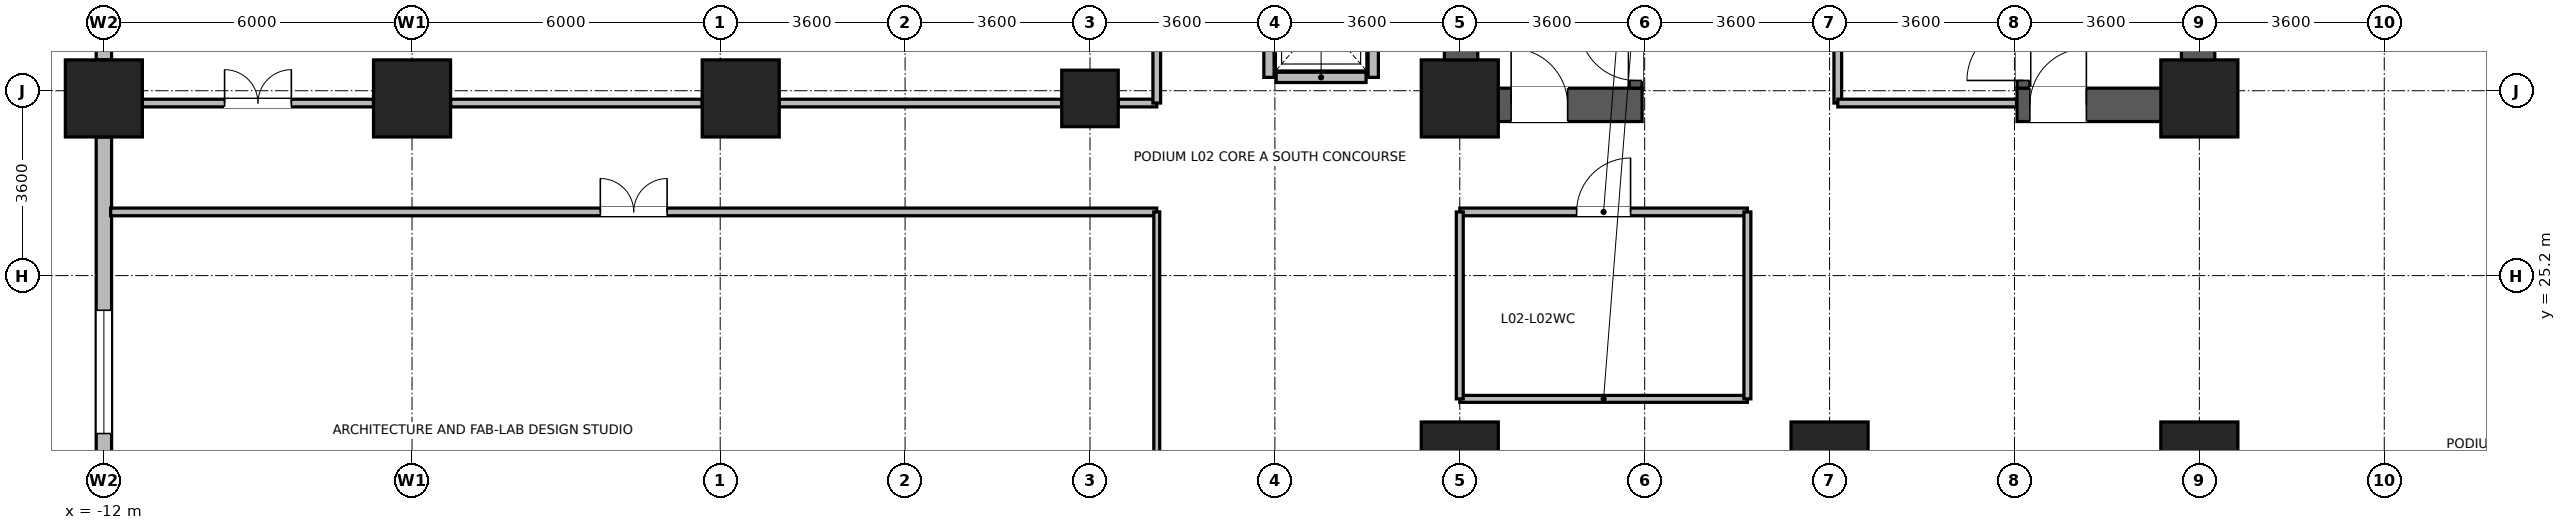
"""IFC4 building model, lengths in metres.
Left out: names, types, materials, properties, quantities, classifications, styles, units other than length and angle.
Written with IfcOpenShell. Run it as: python <this file> out.ifc"""

import sys

from ifc_helpers import new_model, si_unit, direction, frame, frame_2d, origin, origin_2d, place, context, subcontext, project, spatial, rectangle, circle, extrude, source, transform, mapped, element, fill, save


model = new_model("IFC4")
c1 = context("Model", 3, precision=1e-05, world=origin(), true_north=direction((0.0, 1.0)))
c2 = subcontext(c1, "Body", "Model", "MODEL_VIEW")
j1 = project(units=[si_unit("LENGTHUNIT", "METRE"), si_unit("PLANEANGLEUNIT", "RADIAN")], contexts=[c1])
p1 = place(None, origin())
s1 = spatial("IfcSite", under=j1, at=p1, CompositionType="ELEMENT")
p2 = place(p1, origin())
s2 = spatial("IfcBuilding", under=s1, at=p2, CompositionType="ELEMENT")
p3 = place(p2, frame((0.0, 0.0, 10.2)))
s3 = spatial("IfcBuildingStorey", under=s2, at=p3, CompositionType="ELEMENT", Elevation=10.2)
for number, where, z_axis, x_axis in (
    (1, (14.425, 28.2, 0.0), (0.0, 0.0, 1.0), (0.0, 1.0, 0.0)),
    (2, (28.775, 28.2, 0.0), (0.0, 0.0, 1.0), (0.0, 1.0, 0.0)),
):
    element("IfcWall", number, at=place(p3, frame(where, z_axis=z_axis, x_axis=x_axis)), inside=s3, PredefinedType="SHEAR", context=c2, shape_type="SweptSolid", body=[
        extrude(rectangle(XDim=8.3, YDim=0.65, at=frame_2d((4.15, 0.0))), origin(), (0.0, 0.0, 1.0), 4.52),
    ])
p4 = place(p3, frame((14.75, 28.525, 0.0), z_axis=(0.0, 0.0, 1.0), x_axis=(1.0, 0.0, 0.0)))
e3 = element("IfcWall", 3, at=p4, inside=s3, PredefinedType="SHEAR", context=c2, shape_type="SweptSolid", body=[
    extrude(rectangle(XDim=3.2, YDim=0.65, at=frame_2d((1.6, 0.0))), origin(), (0.0, 0.0, 1.0), 4.52),
])
p5 = place(p4, frame((0.65, 0.0, 0.0)))
e4 = element("IfcOpeningElement", 4, at=p5, cuts=e3, PredefinedType="OPENING", context=c2, shape_type="SweptSolid", body=[
    extrude(rectangle(XDim=1.1, YDim=2.08, at=frame_2d((0.55, 1.04))), frame((0.0, 0.335, 0.0), z_axis=(0.0, -1.0, 0.0), x_axis=(1.0, 0.0, 0.0)), (0.0, 0.0, 1.0), 0.67),
])
p6 = place(p3, frame((25.25, 28.525, 0.0), z_axis=(0.0, 0.0, 1.0), x_axis=(1.0, 0.0, 0.0)))
e5 = element("IfcWall", 5, at=p6, inside=s3, PredefinedType="SHEAR", context=c2, shape_type="SweptSolid", body=[
    extrude(rectangle(XDim=3.2, YDim=0.65, at=frame_2d((1.6, 0.0))), origin(), (0.0, 0.0, 1.0), 4.52),
])
p7 = place(p6, frame((0.25, 0.0, 0.0)))
e6 = element("IfcOpeningElement", 6, at=p7, cuts=e5, PredefinedType="OPENING", context=c2, shape_type="SweptSolid", body=[
    extrude(rectangle(XDim=1.1, YDim=2.08, at=frame_2d((0.55, 1.04))), frame((0.0, 0.335, 0.0), z_axis=(0.0, -1.0, 0.0), x_axis=(1.0, 0.0, 0.0)), (0.0, 0.0, 1.0), 0.67),
])
p8 = place(p3, frame((17.825, 28.85, 0.0), z_axis=(0.0, 0.0, 1.0), x_axis=(0.0, 1.0, 0.0)))
e7 = element("IfcWall", 7, at=p8, inside=s3, PredefinedType="SHEAR", context=c2, shape_type="SweptSolid", body=[
    extrude(rectangle(XDim=7.0, YDim=0.25, at=frame_2d((3.5, 0.0))), origin(), (0.0, 0.0, 1.0), 4.52),
])
p9 = place(p8, frame((0.15, 0.0, 0.0)))
e8 = element("IfcOpeningElement", 8, at=p9, cuts=e7, PredefinedType="OPENING", context=c2, shape_type="SweptSolid", body=[
    extrude(rectangle(XDim=1.1, YDim=2.08, at=frame_2d((0.55, 1.04))), frame((0.0, 0.135, 0.0), z_axis=(0.0, -1.0, 0.0), x_axis=(1.0, 0.0, 0.0)), (0.0, 0.0, 1.0), 0.27),
])
p10 = place(p3, frame((25.375, 28.85, 0.0), z_axis=(0.0, 0.0, 1.0), x_axis=(0.0, 1.0, 0.0)))
e9 = element("IfcWall", 9, at=p10, inside=s3, PredefinedType="SHEAR", context=c2, shape_type="SweptSolid", body=[
    extrude(rectangle(XDim=7.0, YDim=0.25, at=frame_2d((3.5, 0.0))), origin(), (0.0, 0.0, 1.0), 4.52),
])
p11 = place(p10, frame((0.15, 0.0, 0.0)))
e10 = element("IfcOpeningElement", 10, at=p11, cuts=e9, PredefinedType="OPENING", context=c2, shape_type="SweptSolid", body=[
    extrude(rectangle(XDim=1.1, YDim=2.08, at=frame_2d((0.55, 1.04))), frame((0.0, 0.135, 0.0), z_axis=(0.0, -1.0, 0.0), x_axis=(1.0, 0.0, 0.0)), (0.0, 0.0, 1.0), 0.27),
])
m1 = source(origin(), c2, "Body", "SweptSolid", [
    extrude(circle(Radius=0.55, at=origin_2d()), origin(), (0.0, 0.0, 1.0), 4.8),
])
p12 = place(p3, frame((7.2, 28.65, 0.0), z_axis=(0.0, 0.0, 1.0), x_axis=(1.0, 0.0, 0.0)))
e11 = element("IfcColumn", 11, at=p12, inside=s3, PredefinedType="COLUMN", context=c2, shape_type="MappedRepresentation", body=[
    mapped(m1, transform((0.0, 0.0, 0.0), x_axis=(1.0, 0.0, 0.0), y_axis=(0.0, 1.0, 0.0), z_axis=(0.0, 0.0, 1.0), scale=1.0)),
])
m2 = source(origin(), c2, "Body", "SweptSolid", [
    extrude(rectangle(XDim=1.5, YDim=1.5, at=origin_2d()), origin(), (0.0, 0.0, 1.0), 4.8),
])
for number, where, z_axis, x_axis in (
    (12, (14.4, 21.6, 0.0), (0.0, 0.0, 1.0), (1.0, 0.0, 0.0)),
    (13, (14.4, 28.65, 0.0), (0.0, 0.0, 1.0), (1.0, 0.0, 0.0)),
    (14, (21.6, 21.6, 0.0), (0.0, 0.0, 1.0), (1.0, 0.0, 0.0)),
    (15, (28.8, 21.6, 0.0), (0.0, 0.0, 1.0), (1.0, 0.0, 0.0)),
    (16, (28.8, 28.65, 0.0), (0.0, 0.0, 1.0), (1.0, 0.0, 0.0)),
    (17, (0.4, 28.65, 0.0), (0.0, 0.0, 1.0), (1.0, 0.0, 0.0)),
    (18, (-12.0, 28.65, 0.0), (0.0, 0.0, 1.0), (1.0, 0.0, 0.0)),
    (19, (-6.0, 28.65, 0.0), (0.0, 0.0, 1.0), (1.0, 0.0, 0.0)),
):
    element("IfcColumn", number, at=place(p3, frame(where, z_axis=z_axis, x_axis=x_axis)), inside=s3, PredefinedType="COLUMN", context=c2, shape_type="MappedRepresentation", body=[
        mapped(m2, transform((0.0, 0.0, 0.0), x_axis=(1.0, 0.0, 0.0), y_axis=(0.0, 1.0, 0.0), z_axis=(0.0, 0.0, 1.0), scale=1.0)),
    ])
p13 = place(p3, frame((-12.0, 29.401, 0.0), z_axis=(0.0, 0.0, 1.0), x_axis=(0.0, 1.0, 0.0)))
e20 = element("IfcWall", 20, at=p13, inside=s3, PredefinedType="STANDARD", context=c2, shape_type="SweptSolid", body=[
    extrude(rectangle(XDim=5.998, YDim=0.3, at=frame_2d((2.999, 0.0))), origin(), (0.0, 0.0, 1.0), 3.9),
])
p14 = place(p13, frame((2.524, 0.0, 0.9)))
e21 = element("IfcOpeningElement", 21, at=p14, cuts=e20, PredefinedType="OPENING", context=c2, shape_type="SweptSolid", body=[
    extrude(rectangle(XDim=0.95, YDim=1.75, at=frame_2d((0.475, 0.875))), frame((0.0, 0.16, 0.0), z_axis=(0.0, -1.0, 0.0), x_axis=(1.0, 0.0, 0.0)), (0.0, 0.0, 1.0), 0.32),
])
p15 = place(p13, frame((1.037, 0.0, 0.9)))
e22 = element("IfcOpeningElement", 22, at=p15, cuts=e20, PredefinedType="OPENING", context=c2, shape_type="SweptSolid", body=[
    extrude(rectangle(XDim=0.95, YDim=1.75, at=frame_2d((0.475, 0.875))), frame((0.0, 0.16, 0.0), z_axis=(0.0, -1.0, 0.0), x_axis=(1.0, 0.0, 0.0)), (0.0, 0.0, 1.0), 0.32),
])
p16 = place(p3, frame((-12.0, 18.751, 0.0), z_axis=(0.0, 0.0, 1.0), x_axis=(0.0, 1.0, 0.0)))
e23 = element("IfcWall", 23, at=p16, inside=s3, PredefinedType="STANDARD", context=c2, shape_type="SweptSolid", body=[
    extrude(rectangle(XDim=9.148, YDim=0.3, at=frame_2d((4.574, 0.0))), origin(), (0.0, 0.0, 1.0), 3.9),
])
p17 = place(p16, frame((0.325, 0.0, 0.9)))
e24 = element("IfcOpeningElement", 24, at=p17, cuts=e23, PredefinedType="OPENING", context=c2, shape_type="SweptSolid", body=[
    extrude(rectangle(XDim=2.4, YDim=2.5, at=frame_2d((1.2, 1.25))), frame((0.0, 0.16, 0.0), z_axis=(0.0, -1.0, 0.0), x_axis=(1.0, 0.0, 0.0)), (0.0, 0.0, 1.0), 0.32),
])
p18 = place(p16, frame((3.374, 0.0, 0.9)))
e25 = element("IfcOpeningElement", 25, at=p18, cuts=e23, PredefinedType="OPENING", context=c2, shape_type="SweptSolid", body=[
    extrude(rectangle(XDim=2.4, YDim=2.5, at=frame_2d((1.2, 1.25))), frame((0.0, 0.16, 0.0), z_axis=(0.0, -1.0, 0.0), x_axis=(1.0, 0.0, 0.0)), (0.0, 0.0, 1.0), 0.32),
])
p19 = place(p3, frame((10.825, 29.06, 0.0), z_axis=(0.0, 0.0, 1.0), x_axis=(1.0, 0.0, 0.0)))
e26 = element("IfcWall", 26, at=p19, inside=s3, PredefinedType="PARTITIONING", context=c2, shape_type="SweptSolid", body=[
    extrude(rectangle(XDim=1.75, YDim=0.2, at=frame_2d((0.875, 0.0))), origin(), (0.0, 0.0, 1.0), 4.5),
])
for number, where, z_axis, x_axis in (
    (27, (10.685, 29.06, 0.0), (0.0, 0.0, 1.0), (0.0, 1.0, 0.0)),
    (28, (12.715, 29.06, 0.0), (0.0, 0.0, 1.0), (0.0, 1.0, 0.0)),
):
    element("IfcWall", number, at=place(p3, frame(where, z_axis=z_axis, x_axis=x_axis)), inside=s3, PredefinedType="PARTITIONING", context=c2, shape_type="SweptSolid", body=[
        extrude(rectangle(XDim=2.28, YDim=0.2, at=frame_2d((1.14, 0.0))), origin(), (0.0, 0.0, 1.0), 4.5),
    ])
p20 = place(p3, frame((-11.868, 26.44, 0.0), z_axis=(0.0, 0.0, 1.0), x_axis=(1.0, 0.0, 0.0)))
e29 = element("IfcWall", 29, at=p20, inside=s3, PredefinedType="PARTITIONING", context=c2, shape_type="SweptSolid", body=[
    extrude(rectangle(XDim=20.368, YDim=0.15, at=frame_2d((10.184, 0.0))), origin(), (0.0, 0.0, 1.0), 4.5),
])
p21 = place(p20, frame((9.534, 0.0, 0.0)))
e30 = element("IfcOpeningElement", 30, at=p21, cuts=e29, PredefinedType="OPENING", context=c2, shape_type="SweptSolid", body=[
    extrude(rectangle(XDim=1.3, YDim=2.12, at=frame_2d((0.65, 1.06))), frame((0.0, 0.085, 0.0), z_axis=(0.0, -1.0, 0.0), x_axis=(1.0, 0.0, 0.0)), (0.0, 0.0, 1.0), 0.17),
])
p22 = place(p3, frame((-11.25, 28.56, 0.0), z_axis=(0.0, 0.0, 1.0), x_axis=(1.0, 0.0, 0.0)))
e31 = element("IfcWall", 31, at=p22, inside=s3, PredefinedType="PARTITIONING", context=c2, shape_type="SweptSolid", body=[
    extrude(rectangle(XDim=4.5, YDim=0.15, at=frame_2d((2.25, 0.0))), origin(), (0.0, 0.0, 1.0), 3.8),
])
p23 = place(p22, frame((1.6, 0.0, 0.0)))
e32 = element("IfcOpeningElement", 32, at=p23, cuts=e31, PredefinedType="OPENING", context=c2, shape_type="SweptSolid", body=[
    extrude(rectangle(XDim=1.3, YDim=2.12, at=frame_2d((0.65, 1.06))), frame((0.0, 0.085, 0.0), z_axis=(0.0, -1.0, 0.0), x_axis=(1.0, 0.0, 0.0)), (0.0, 0.0, 1.0), 0.17),
])
p24 = place(p3, frame((-5.25, 28.56, 0.0), z_axis=(0.0, 0.0, 1.0), x_axis=(1.0, 0.0, 0.0)))
e33 = element("IfcWall", 33, at=p24, inside=s3, PredefinedType="PARTITIONING", context=c2, shape_type="SweptSolid", body=[
    extrude(rectangle(XDim=4.9, YDim=0.15, at=frame_2d((2.45, 0.0))), origin(), (0.0, 0.0, 1.0), 3.8),
])
p25 = place(p3, frame((1.15, 28.56, 0.0), z_axis=(0.0, 0.0, 1.0), x_axis=(1.0, 0.0, 0.0)))
e34 = element("IfcWall", 34, at=p25, inside=s3, PredefinedType="PARTITIONING", context=c2, shape_type="SweptSolid", body=[
    extrude(rectangle(XDim=5.5, YDim=0.15, at=frame_2d((2.75, 0.0))), origin(), (0.0, 0.0, 1.0), 3.8),
])
p26 = place(p3, frame((7.75, 28.56, 0.0), z_axis=(0.0, 0.0, 1.0), x_axis=(1.0, 0.0, 0.0)))
e35 = element("IfcWall", 35, at=p26, inside=s3, PredefinedType="PARTITIONING", context=c2, shape_type="SweptSolid", body=[
    extrude(rectangle(XDim=0.75, YDim=0.15, at=frame_2d((0.375, 0.0))), origin(), (0.0, 0.0, 1.0), 3.8),
])
p27 = place(p3, frame((8.5, 28.56, 0.0), z_axis=(0.0, 0.0, 1.0), x_axis=(0.0, 1.0, 0.0)))
e36 = element("IfcWall", 36, at=p27, inside=s3, PredefinedType="PARTITIONING", context=c2, shape_type="SweptSolid", body=[
    extrude(rectangle(XDim=7.68, YDim=0.15, at=frame_2d((3.84, 0.0))), origin(), (0.0, 0.0, 1.0), 4.5),
])
p28 = place(p3, frame((14.4, 26.44, 0.0), z_axis=(0.0, 0.0, 1.0), x_axis=(1.0, 0.0, 0.0)))
e37 = element("IfcWall", 37, at=p28, inside=s3, PredefinedType="PARTITIONING", context=c2, shape_type="SweptSolid", body=[
    extrude(rectangle(XDim=5.6, YDim=0.15, at=frame_2d((2.8, 0.0))), origin(), (0.0, 0.0, 1.0), 4.5),
])
p29 = place(p28, frame((2.275, 0.0, 0.0)))
e38 = element("IfcOpeningElement", 38, at=p29, cuts=e37, PredefinedType="OPENING", context=c2, shape_type="SweptSolid", body=[
    extrude(rectangle(XDim=1.05, YDim=2.12, at=frame_2d((0.525, 1.06))), frame((0.0, 0.085, 0.0), z_axis=(0.0, -1.0, 0.0), x_axis=(1.0, 0.0, 0.0)), (0.0, 0.0, 1.0), 0.17),
])
p30 = place(p3, frame((8.5, 18.132, 0.0), z_axis=(0.0, 0.0, 1.0), x_axis=(0.0, 1.0, 0.0)))
e39 = element("IfcWall", 39, at=p30, inside=s3, PredefinedType="PARTITIONING", context=c2, shape_type="SweptSolid", body=[
    extrude(rectangle(XDim=8.308, YDim=0.115, at=frame_2d((4.154, 0.0))), origin(), (0.0, 0.0, 1.0), 4.5),
])
p31 = place(p3, frame((14.4, 22.8, 0.0), z_axis=(0.0, 0.0, 1.0), x_axis=(1.0, 0.0, 0.0)))
e40 = element("IfcWall", 40, at=p31, inside=s3, PredefinedType="PARTITIONING", context=c2, shape_type="SweptSolid", body=[
    extrude(rectangle(XDim=5.6, YDim=0.135, at=frame_2d((2.8, 0.0))), origin(), (0.0, 0.0, 1.0), 4.5),
])
p32 = place(p3, frame((21.76, 28.56, 0.0), z_axis=(0.0, 0.0, 1.0), x_axis=(0.0, 1.0, 0.0)))
e41 = element("IfcWall", 41, at=p32, inside=s3, PredefinedType="PARTITIONING", context=c2, shape_type="SweptSolid", body=[
    extrude(rectangle(XDim=4.6, YDim=0.15, at=frame_2d((2.3, 0.0))), origin(), (0.0, 0.0, 1.0), 4.5),
])
p33 = place(p32, frame((1.55, 0.0, 0.0)))
e42 = element("IfcOpeningElement", 42, at=p33, cuts=e41, PredefinedType="OPENING", context=c2, shape_type="SweptSolid", body=[
    extrude(rectangle(XDim=1.5, YDim=2.1, at=frame_2d((0.75, 1.05))), frame((0.0, 0.085, 0.0), z_axis=(0.0, -1.0, 0.0), x_axis=(1.0, 0.0, 0.0)), (0.0, 0.0, 1.0), 0.17),
])
p34 = place(p3, frame((14.4, 22.8, 0.0), z_axis=(0.0, 0.0, 1.0), x_axis=(0.0, 1.0, 0.0)))
e43 = element("IfcWall", 43, at=p34, inside=s3, PredefinedType="PARTITIONING", context=c2, shape_type="SweptSolid", body=[
    extrude(rectangle(XDim=3.64, YDim=0.135, at=frame_2d((1.82, 0.0))), origin(), (0.0, 0.0, 1.0), 3.9),
])
p35 = place(p3, frame((20.0, 22.8, 0.0), z_axis=(0.0, 0.0, 1.0), x_axis=(0.0, 1.0, 0.0)))
e44 = element("IfcWall", 44, at=p35, inside=s3, PredefinedType="PARTITIONING", context=c2, shape_type="SweptSolid", body=[
    extrude(rectangle(XDim=3.64, YDim=0.135, at=frame_2d((1.82, 0.0))), origin(), (0.0, 0.0, 1.0), 4.5),
])
p36 = place(p3, frame((21.76, 28.56, 0.0), z_axis=(0.0, 0.0, 1.0), x_axis=(1.0, 0.0, 0.0)))
e45 = element("IfcWall", 45, at=p36, inside=s3, PredefinedType="PARTITIONING", context=c2, shape_type="SweptSolid", body=[
    extrude(rectangle(XDim=3.48, YDim=0.15, at=frame_2d((1.74, 0.0))), origin(), (0.0, 0.0, 1.0), 3.3),
])
p37 = place(p18, origin())
e46 = element("IfcWindow", 46, at=p37, inside=s3, PartitioningType="SINGLE_PANEL", PredefinedType="WINDOW", context=c2, shape_type="SweptSolid", body=[
    extrude(rectangle(XDim=2.4, YDim=2.5, at=frame_2d((1.2, 1.25))), frame((0.0, 0.03, 0.0), z_axis=(0.0, -1.0, 0.0), x_axis=(1.0, 0.0, 0.0)), (0.0, 0.0, 1.0), 0.06),
])
fill(e25, e46)
p38 = place(p9, origin())
e47 = element("IfcDoor", 47, at=p38, inside=s3, OperationType="SINGLE_SWING_RIGHT", PredefinedType="DOOR", context=c2, shape_type="SweptSolid", body=[
    extrude(rectangle(XDim=1.1, YDim=2.08, at=frame_2d((0.55, 1.04))), frame((0.0, 0.025, 0.0), z_axis=(0.0, -1.0, 0.0), x_axis=(1.0, 0.0, 0.0)), (0.0, 0.0, 1.0), 0.05),
])
fill(e8, e47)
p39 = place(p5, origin())
e48 = element("IfcDoor", 48, at=p39, inside=s3, OperationType="SINGLE_SWING_LEFT", PredefinedType="DOOR", context=c2, shape_type="SweptSolid", body=[
    extrude(rectangle(XDim=1.1, YDim=2.08, at=frame_2d((0.55, 1.04))), frame((0.0, 0.025, 0.0), z_axis=(0.0, -1.0, 0.0), x_axis=(1.0, 0.0, 0.0)), (0.0, 0.0, 1.0), 0.05),
])
fill(e4, e48)
p40 = place(p11, origin())
e49 = element("IfcDoor", 49, at=p40, inside=s3, OperationType="SINGLE_SWING_LEFT", PredefinedType="DOOR", context=c2, shape_type="SweptSolid", body=[
    extrude(rectangle(XDim=1.1, YDim=2.08, at=frame_2d((0.55, 1.04))), frame((0.0, 0.025, 0.0), z_axis=(0.0, -1.0, 0.0), x_axis=(1.0, 0.0, 0.0)), (0.0, 0.0, 1.0), 0.05),
])
fill(e10, e49)
p41 = place(p7, origin())
e50 = element("IfcDoor", 50, at=p41, inside=s3, OperationType="SINGLE_SWING_RIGHT", PredefinedType="DOOR", context=c2, shape_type="SweptSolid", body=[
    extrude(rectangle(XDim=1.1, YDim=2.08, at=frame_2d((0.55, 1.04))), frame((0.0, 0.025, 0.0), z_axis=(0.0, -1.0, 0.0), x_axis=(1.0, 0.0, 0.0)), (0.0, 0.0, 1.0), 0.05),
])
fill(e6, e50)
p42 = place(p21, origin())
e51 = element("IfcDoor", 51, at=p42, inside=s3, OperationType="DOUBLE_DOOR_SINGLE_SWING", PredefinedType="DOOR", context=c2, shape_type="SweptSolid", body=[
    extrude(rectangle(XDim=1.3, YDim=2.12, at=frame_2d((0.65, 1.06))), frame((0.0, 0.025, 0.0), z_axis=(0.0, -1.0, 0.0), x_axis=(1.0, 0.0, 0.0)), (0.0, 0.0, 1.0), 0.05),
])
fill(e30, e51)
p43 = place(p23, origin())
e52 = element("IfcDoor", 52, at=p43, inside=s3, OperationType="DOUBLE_DOOR_SINGLE_SWING", PredefinedType="DOOR", context=c2, shape_type="SweptSolid", body=[
    extrude(rectangle(XDim=1.3, YDim=2.12, at=frame_2d((0.65, 1.06))), frame((0.0, 0.025, 0.0), z_axis=(0.0, -1.0, 0.0), x_axis=(1.0, 0.0, 0.0)), (0.0, 0.0, 1.0), 0.05),
])
fill(e32, e52)
p44 = place(p29, origin())
e53 = element("IfcDoor", 53, at=p44, inside=s3, OperationType="SINGLE_SWING_RIGHT", PredefinedType="DOOR", context=c2, shape_type="SweptSolid", body=[
    extrude(rectangle(XDim=1.05, YDim=2.12, at=frame_2d((0.525, 1.06))), frame((0.0, 0.025, 0.0), z_axis=(0.0, -1.0, 0.0), x_axis=(1.0, 0.0, 0.0)), (0.0, 0.0, 1.0), 0.05),
])
fill(e38, e53)
save(model, sys.argv[1])
